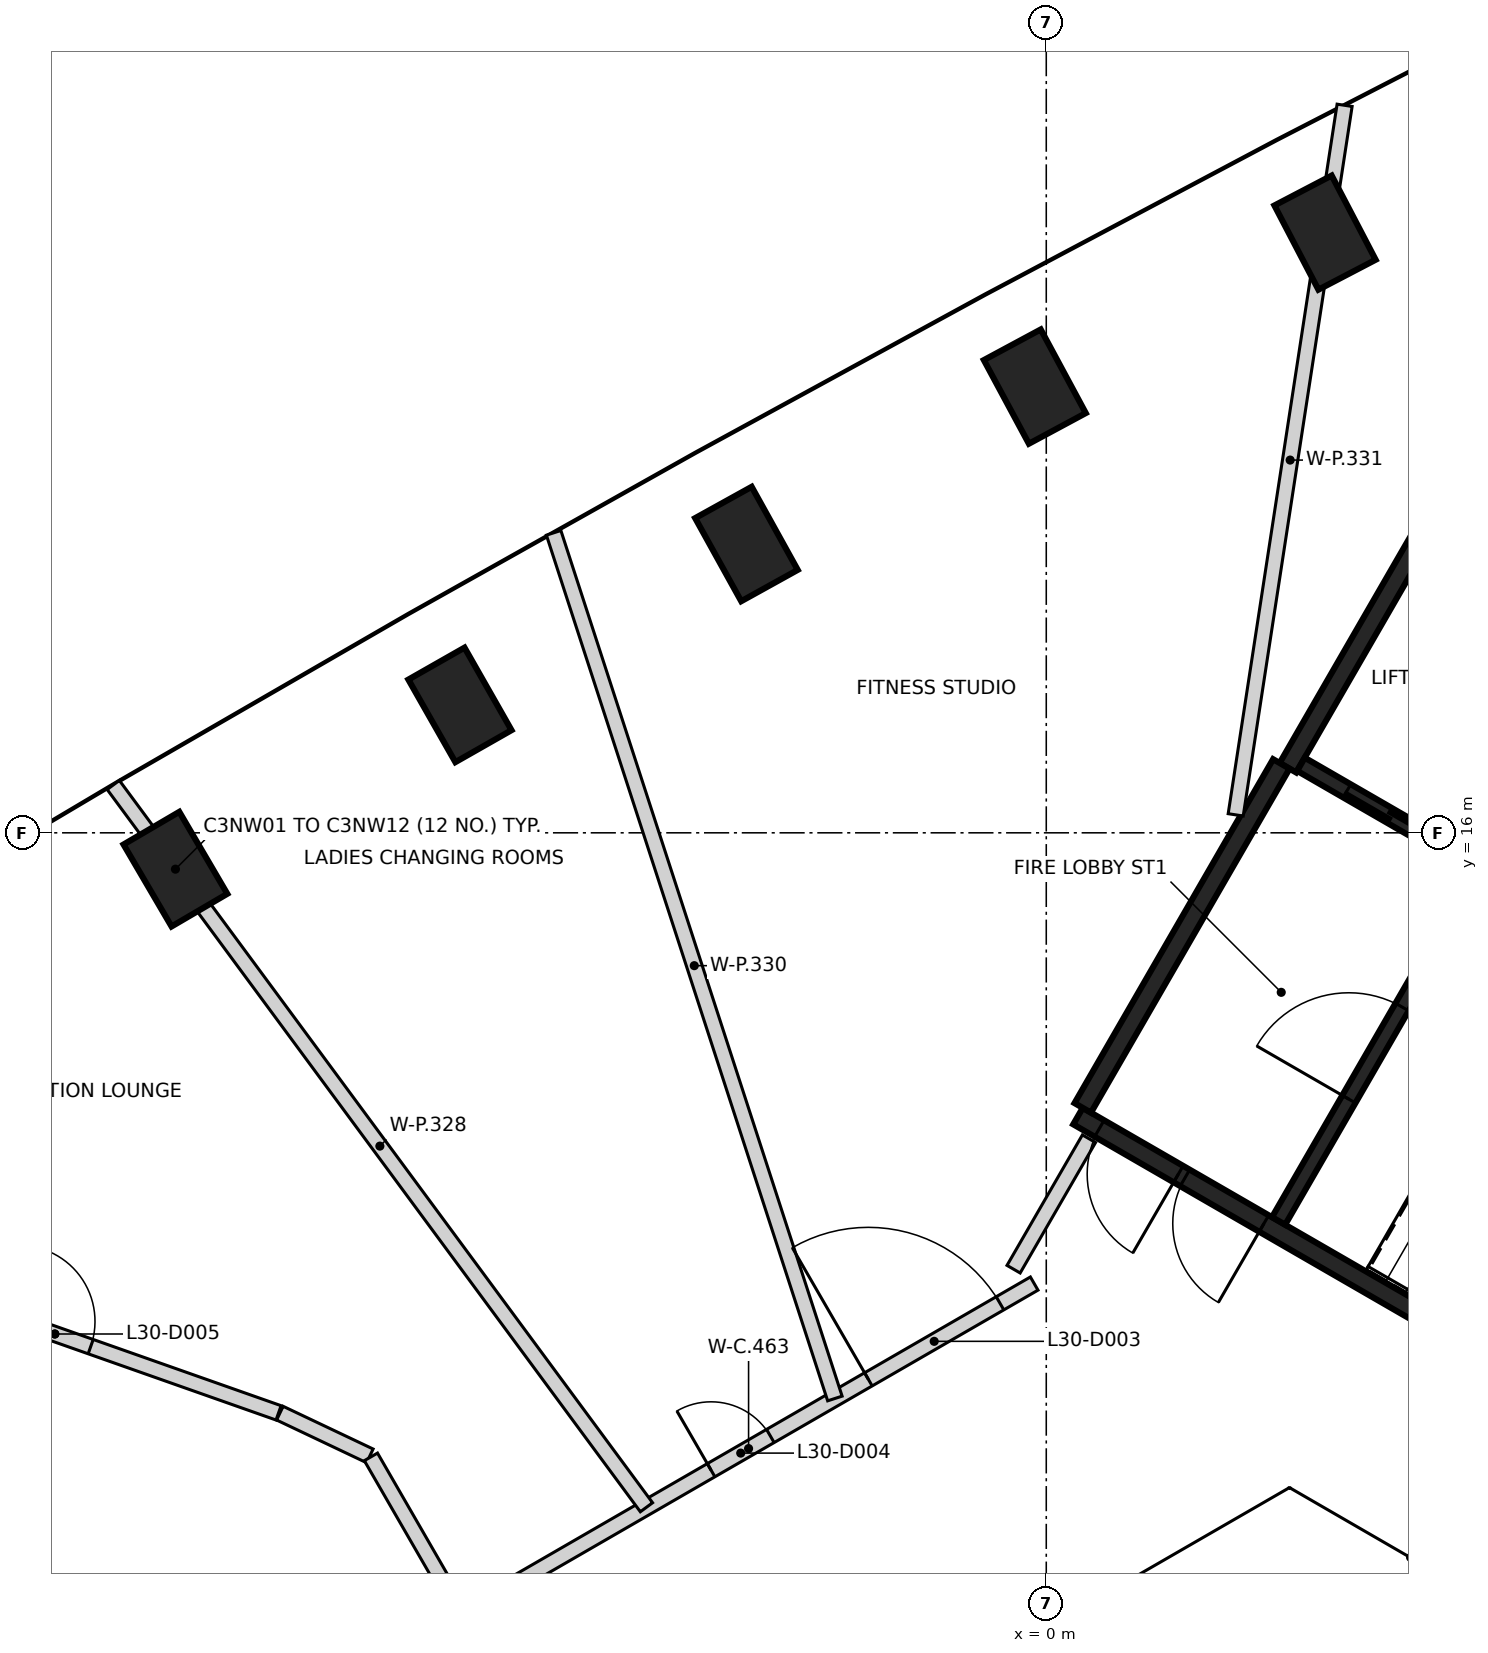
"""IFC4 building model, lengths in metres.
Left out: names, types, materials, properties, quantities, classifications, styles, units other than length and angle.
Written with IfcOpenShell. Run it as: python <this file> out.ifc"""

import sys

from ifc_helpers import new_model, si_unit, direction, frame, frame_2d, origin, origin_2d, place, context, subcontext, project, spatial, rectangle, extrude, element, fill, save


model = new_model("IFC4")
c1 = context("Model", 3, precision=1e-05, world=origin(), true_north=direction((0.0, 1.0)))
c2 = subcontext(c1, "Body", "Model", "MODEL_VIEW")
j1 = project(units=[si_unit("LENGTHUNIT", "METRE"), si_unit("PLANEANGLEUNIT", "RADIAN")], contexts=[c1])
p1 = place(None, origin())
s1 = spatial("IfcSite", under=j1, at=p1, CompositionType="ELEMENT")
p2 = place(p1, origin())
s2 = spatial("IfcBuilding", under=s1, at=p2, CompositionType="ELEMENT")
p3 = place(p2, frame((0.0, 0.0, 123.8)))
s3 = spatial("IfcBuildingStorey", under=s2, at=p3, CompositionType="ELEMENT", Elevation=123.8)
for number, where, z_axis, x_axis in (
    (1, (3.667, 23.896, -0.4), (0.0, 0.0, 1.0), (-0.463, 0.886, 0.0)),
    (2, (-0.151, 21.871, -0.4), (0.0, 0.0, 1.0), (-0.474, 0.881, 0.0)),
    (3, (-3.945, 19.8, -0.4), (0.0, 0.0, 1.0), (-0.485, 0.875, 0.0)),
    (4, (-7.714, 17.683, -0.4), (0.0, 0.0, 1.0), (-0.495, 0.869, 0.0)),
    (5, (-11.457, 15.522, -0.4), (0.0, 0.0, 1.0), (-0.505, 0.863, 0.0)),
):
    element("IfcColumn", number, at=place(p3, frame(where, z_axis=z_axis, x_axis=x_axis)), inside=s3, PredefinedType="COLUMN", context=c2, shape_type="SweptSolid", body=[
        extrude(rectangle(XDim=1.25, YDim=0.85, at=origin_2d()), origin(), (0.0, 0.0, 1.0), 5.0),
    ])
p4 = place(p3, frame((10.42, 6.498, 0.0), z_axis=(0.0, 0.0, 1.0), x_axis=(-0.866021906294, 0.500006057782, 0.0)))
e6 = element("IfcWall", 6, at=p4, inside=s3, PredefinedType="SHEAR", context=c2, shape_type="SweptSolid", body=[
    extrude(rectangle(XDim=11.55, YDim=0.25, at=frame_2d((5.775, 0.0))), origin(), (0.0, 0.0, 1.0), 4.6),
])
p5 = place(p4, frame((10.025, 0.0, 0.0)))
e7 = element("IfcOpeningElement", 7, at=p5, cuts=e6, PredefinedType="OPENING", context=c2, shape_type="SweptSolid", body=[
    extrude(rectangle(XDim=1.2, YDim=2.1, at=frame_2d((0.6, 1.05))), frame((0.0, 0.135, 0.0), z_axis=(0.0, -1.0, 0.0), x_axis=(1.0, 0.0, 0.0)), (0.0, 0.0, 1.0), 0.27),
])
p6 = place(p4, frame((8.725, 0.0, 0.0)))
e8 = element("IfcOpeningElement", 8, at=p6, cuts=e6, PredefinedType="OPENING", context=c2, shape_type="SweptSolid", body=[
    extrude(rectangle(XDim=1.2, YDim=2.1, at=frame_2d((0.6, 1.05))), frame((0.0, 0.135, 0.0), z_axis=(0.0, -1.0, 0.0), x_axis=(1.0, 0.0, 0.0)), (0.0, 0.0, 1.0), 0.27),
])
p7 = place(p3, frame((3.179, 16.856, 0.0), z_axis=(0.0, 0.0, 1.0), x_axis=(0.500004234368, 0.866022959057, 0.0)))
e9 = element("IfcWall", 9, at=p7, inside=s3, PredefinedType="SHEAR", context=c2, shape_type="SweptSolid", body=[
    extrude(rectangle(XDim=6.25, YDim=0.25, at=frame_2d((3.125, 0.0))), origin(), (0.0, 0.0, 1.0), 4.6),
])
p8 = place(p3, frame((0.48, 12.381, 0.0), z_axis=(0.0, 0.0, 1.0), x_axis=(0.49999885962, 0.866026062182, 0.0)))
e10 = element("IfcWall", 10, at=p8, inside=s3, PredefinedType="SHEAR", context=c2, shape_type="SweptSolid", body=[
    extrude(rectangle(XDim=5.225, YDim=0.25, at=frame_2d((2.612, 0.0))), origin(), (0.0, 0.0, 1.0), 4.6),
])
p9 = place(p3, frame((3.057, 10.895, 0.0), z_axis=(0.0, 0.0, 1.0), x_axis=(0.499989418164, 0.866031513124, 0.0)))
e11 = element("IfcWall", 11, at=p9, inside=s3, PredefinedType="SHEAR", context=c2, shape_type="SweptSolid", body=[
    extrude(rectangle(XDim=5.251, YDim=0.2, at=frame_2d((2.625, 0.0))), origin(), (0.0, 0.0, 1.0), 4.6),
])
p10 = place(p9, frame((1.849, 0.0, 0.0)))
e12 = element("IfcOpeningElement", 12, at=p10, cuts=e11, PredefinedType="OPENING", context=c2, shape_type="SweptSolid", body=[
    extrude(rectangle(XDim=1.4, YDim=2.1, at=frame_2d((0.7, 1.05))), frame((0.0, 0.11, 0.0), z_axis=(0.0, -1.0, 0.0), x_axis=(1.0, 0.0, 0.0)), (0.0, 0.0, 1.0), 0.22),
])
p11 = place(p3, frame((5.725, 15.531, 0.0), z_axis=(0.0, 0.0, 1.0), x_axis=(-0.866037306777, 0.499979382845, 0.0)))
e13 = element("IfcWall", 13, at=p11, inside=s3, PredefinedType="SHEAR", context=c2, shape_type="SweptSolid", body=[
    extrude(rectangle(XDim=2.742, YDim=0.2, at=frame_2d((1.371, 0.0))), origin(), (0.0, 0.0, 1.0), 4.6),
])
p12 = place(p11, frame((0.743, 0.0, 0.0)))
e14 = element("IfcOpeningElement", 14, at=p12, cuts=e13, PredefinedType="OPENING", context=c2, shape_type="SweptSolid", body=[
    extrude(rectangle(XDim=1.3, YDim=2.1, at=frame_2d((0.65, 1.05))), frame((0.0, 0.11, 0.0), z_axis=(0.0, -1.0, 0.0), x_axis=(1.0, 0.0, 0.0)), (0.0, 0.0, 1.0), 0.22),
])
p13 = place(p3, frame((-15.987, 10.444, 0.0), z_axis=(0.0, 0.0, 1.0), x_axis=(0.943118792832, -0.332455925811, 0.0)))
e15 = element("IfcWall", 15, at=p13, inside=s3, PredefinedType="PARTITIONING", context=c2, shape_type="SweptSolid", body=[
    extrude(rectangle(XDim=6.242, YDim=0.2, at=frame_2d((3.121, 0.0))), origin(), (0.0, 0.0, 1.0), 4.6),
])
p14 = place(p13, frame((2.621, 0.0, 0.0)))
e16 = element("IfcOpeningElement", 16, at=p14, cuts=e15, PredefinedType="OPENING", context=c2, shape_type="SweptSolid", body=[
    extrude(rectangle(XDim=1.0, YDim=2.1, at=frame_2d((0.5, 1.05))), frame((0.0, 0.11, 0.0), z_axis=(0.0, -1.0, 0.0), x_axis=(1.0, 0.0, 0.0)), (0.0, 0.0, 1.0), 0.22),
])
p15 = place(p3, frame((-10.083, 8.365, 0.0), z_axis=(0.0, 0.0, 1.0), x_axis=(0.903403797446, -0.428790833344, 0.0)))
e17 = element("IfcWall", 17, at=p15, inside=s3, PredefinedType="PARTITIONING", context=c2, shape_type="SweptSolid", body=[
    extrude(rectangle(XDim=1.311, YDim=0.2, at=frame_2d((0.655, 0.0))), origin(), (0.0, 0.0, 1.0), 4.6),
])
p16 = place(p3, frame((-8.885, 7.79, 0.0), z_axis=(0.0, 0.0, 1.0), x_axis=(0.499657156181, -0.866223254293, 0.0)))
e18 = element("IfcWall", 18, at=p16, inside=s3, PredefinedType="PARTITIONING", context=c2, shape_type="SweptSolid", body=[
    extrude(rectangle(XDim=2.374, YDim=0.2, at=frame_2d((1.187, 0.0))), origin(), (0.0, 0.0, 1.0), 4.6),
])
p17 = place(p3, frame((-7.674, 5.728, 0.0), z_axis=(0.0, 0.0, 1.0), x_axis=(0.865879153223, 0.50025322789, 0.0)))
e19 = element("IfcWall", 19, at=p17, inside=s3, PredefinedType="PARTITIONING", context=c2, shape_type="SweptSolid", body=[
    extrude(rectangle(XDim=8.679, YDim=0.2, at=frame_2d((4.34, 0.0))), origin(), (0.0, 0.0, 1.0), 4.6),
])
p18 = place(p17, frame((6.16, 0.0, 0.0)))
e20 = element("IfcOpeningElement", 20, at=p18, cuts=e19, PredefinedType="OPENING", context=c2, shape_type="SweptSolid", body=[
    extrude(rectangle(XDim=2.0, YDim=2.1, at=frame_2d((1.0, 1.05))), frame((0.0, 0.11, 0.0), z_axis=(0.0, -1.0, 0.0), x_axis=(1.0, 0.0, 0.0)), (0.0, 0.0, 1.0), 0.22),
])
p19 = place(p17, frame((3.77, 0.0, 0.0)))
e21 = element("IfcOpeningElement", 21, at=p19, cuts=e19, PredefinedType="OPENING", context=c2, shape_type="SweptSolid", body=[
    extrude(rectangle(XDim=0.9, YDim=2.1, at=frame_2d((0.45, 1.05))), frame((0.0, 0.11, 0.0), z_axis=(0.0, -1.0, 0.0), x_axis=(1.0, 0.0, 0.0)), (0.0, 0.0, 1.0), 0.22),
])
p20 = place(p3, frame((-0.43, 10.259, 0.0), z_axis=(0.0, 0.0, 1.0), x_axis=(0.500283752163, 0.865861517404, 0.0)))
e22 = element("IfcWall", 22, at=p20, inside=s3, PredefinedType="PARTITIONING", context=c2, shape_type="SweptSolid", body=[
    extrude(rectangle(XDim=1.983, YDim=0.2, at=frame_2d((0.991, 0.0))), origin(), (0.0, 0.0, 1.0), 4.6),
])
p21 = place(p3, frame((-12.275, 16.63, 0.0), z_axis=(0.0, 0.0, 1.0), x_axis=(0.593894030727, -0.804543274328, 0.0)))
e23 = element("IfcWall", 23, at=p21, inside=s3, PredefinedType="PARTITIONING", context=c2, shape_type="SweptSolid", body=[
    extrude(rectangle(XDim=11.811, YDim=0.2, at=frame_2d((5.906, 0.0))), origin(), (0.0, 0.0, 1.0), 4.6),
])
p22 = place(p3, frame((-6.481, 19.947, 0.0), z_axis=(0.0, 0.0, 1.0), x_axis=(0.308988795684, -0.951065678143, 0.0)))
e24 = element("IfcWall", 24, at=p22, inside=s3, PredefinedType="PARTITIONING", context=c2, shape_type="SweptSolid", body=[
    extrude(rectangle(XDim=11.974, YDim=0.2, at=frame_2d((5.987, 0.0))), origin(), (0.0, 0.0, 1.0), 3.7),
])
p23 = place(p3, frame((2.492, 16.236, 0.0), z_axis=(0.0, 0.0, 1.0), x_axis=(0.151721108942, 0.988423343058, 0.0)))
e25 = element("IfcWall", 25, at=p23, inside=s3, PredefinedType="PARTITIONING", context=c2, shape_type="SweptSolid", body=[
    extrude(rectangle(XDim=9.444, YDim=0.2, at=frame_2d((4.722, 0.0))), origin(), (0.0, 0.0, 1.0), 4.6),
])
p24 = place(p12, origin())
e26 = element("IfcDoor", 26, at=p24, inside=s3, OperationType="SLIDING_TO_RIGHT", PredefinedType="DOOR", context=c2, shape_type="SweptSolid", body=[
    extrude(rectangle(XDim=1.3, YDim=2.1, at=frame_2d((0.65, 1.05))), frame((0.0, 0.025, 0.0), z_axis=(0.0, -1.0, 0.0), x_axis=(1.0, 0.0, 0.0)), (0.0, 0.0, 1.0), 0.05),
])
fill(e14, e26)
p25 = place(p5, origin())
e27 = element("IfcDoor", 27, at=p25, inside=s3, OperationType="SINGLE_SWING_LEFT", PredefinedType="DOOR", context=c2, shape_type="SweptSolid", body=[
    extrude(rectangle(XDim=1.2, YDim=2.1, at=frame_2d((0.6, 1.05))), frame((0.0, 0.025, 0.0), z_axis=(0.0, -1.0, 0.0), x_axis=(1.0, 0.0, 0.0)), (0.0, 0.0, 1.0), 0.05),
])
fill(e7, e27)
p26 = place(p6, origin())
e28 = element("IfcDoor", 28, at=p26, inside=s3, OperationType="SINGLE_SWING_RIGHT", PredefinedType="DOOR", context=c2, shape_type="SweptSolid", body=[
    extrude(rectangle(XDim=1.2, YDim=2.1, at=frame_2d((0.6, 1.05))), frame((0.0, 0.025, 0.0), z_axis=(0.0, -1.0, 0.0), x_axis=(1.0, 0.0, 0.0)), (0.0, 0.0, 1.0), 0.05),
])
fill(e8, e28)
p27 = place(p10, origin())
e29 = element("IfcDoor", 29, at=p27, inside=s3, OperationType="SINGLE_SWING_RIGHT", PredefinedType="DOOR", context=c2, shape_type="SweptSolid", body=[
    extrude(rectangle(XDim=1.4, YDim=2.1, at=frame_2d((0.7, 1.05))), frame((0.0, 0.025, 0.0), z_axis=(0.0, -1.0, 0.0), x_axis=(1.0, 0.0, 0.0)), (0.0, 0.0, 1.0), 0.05),
])
fill(e12, e29)
p28 = place(p18, origin())
e30 = element("IfcDoor", 30, at=p28, inside=s3, OperationType="DOUBLE_DOOR_SINGLE_SWING", PredefinedType="DOOR", context=c2, shape_type="SweptSolid", body=[
    extrude(rectangle(XDim=2.0, YDim=2.1, at=frame_2d((1.0, 1.05))), frame((0.0, 0.025, 0.0), z_axis=(0.0, -1.0, 0.0), x_axis=(1.0, 0.0, 0.0)), (0.0, 0.0, 1.0), 0.05),
])
fill(e20, e30)
p29 = place(p19, origin())
e31 = element("IfcDoor", 31, at=p29, inside=s3, OperationType="SINGLE_SWING_LEFT", PredefinedType="DOOR", context=c2, shape_type="SweptSolid", body=[
    extrude(rectangle(XDim=0.9, YDim=2.1, at=frame_2d((0.45, 1.05))), frame((0.0, 0.025, 0.0), z_axis=(0.0, -1.0, 0.0), x_axis=(1.0, 0.0, 0.0)), (0.0, 0.0, 1.0), 0.05),
])
fill(e21, e31)
p30 = place(p14, origin())
e32 = element("IfcDoor", 32, at=p30, inside=s3, OperationType="SINGLE_SWING_LEFT", PredefinedType="DOOR", context=c2, shape_type="SweptSolid", body=[
    extrude(rectangle(XDim=1.0, YDim=2.1, at=frame_2d((0.5, 1.05))), frame((0.0, 0.025, 0.0), z_axis=(0.0, -1.0, 0.0), x_axis=(1.0, 0.0, 0.0)), (0.0, 0.0, 1.0), 0.05),
])
fill(e16, e32)
save(model, sys.argv[1])
